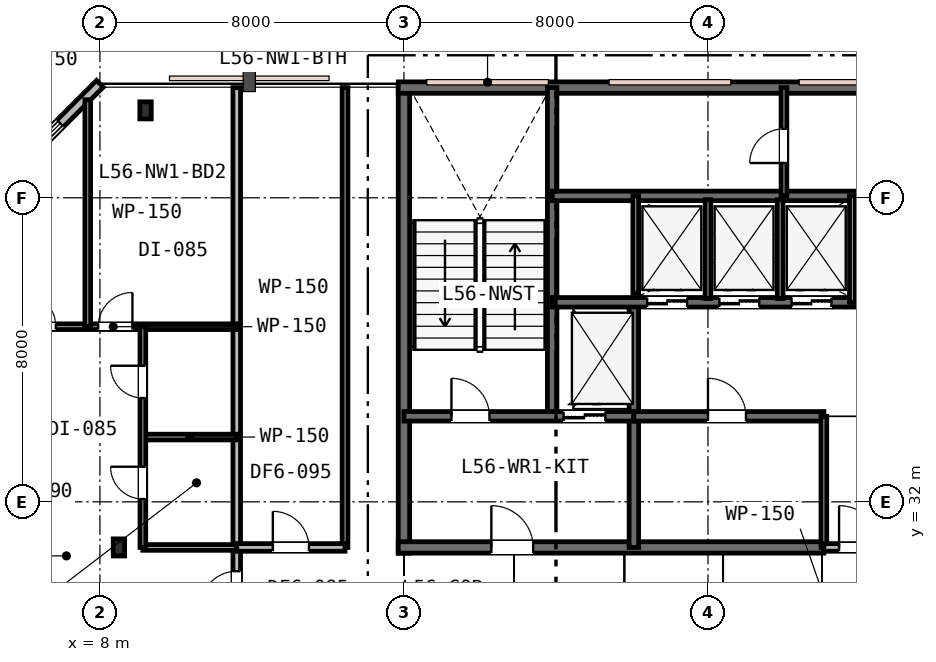
"""IFC4 building model, lengths in metres.
Left out: names, types, materials, properties, quantities, classifications, styles, units other than length and angle.
Written with IfcOpenShell. Run it as: python <this file> out.ifc"""

import sys

from ifc_helpers import new_model, si_unit, direction, frame, frame_2d, origin, origin_2d, place, context, subcontext, project, spatial, rectangle, i_section, extrude, element, fill, save


model = new_model("IFC4")
c1 = context("Model", 3, precision=1e-05, world=origin(), true_north=direction((0.0, 1.0)))
c2 = subcontext(c1, "Body", "Model", "MODEL_VIEW")
j1 = project(units=[si_unit("LENGTHUNIT", "METRE"), si_unit("PLANEANGLEUNIT", "RADIAN")], contexts=[c1])
p1 = place(None, origin())
s1 = spatial("IfcSite", under=j1, at=p1, CompositionType="ELEMENT")
p2 = place(p1, origin())
s2 = spatial("IfcBuilding", under=s1, at=p2, CompositionType="ELEMENT")
p3 = place(p2, frame((0.0, 0.0, 218.4)))
s3 = spatial("IfcBuildingStorey", under=s2, at=p3, CompositionType="ELEMENT", Elevation=218.4)
p4 = place(p3, frame((16.0, 30.65, 0.0), z_axis=(0.0, 0.0, 1.0), x_axis=(0.0, 1.0, 0.0)))
e1 = element("IfcWall", 1, at=p4, inside=s3, PredefinedType="SHEAR", context=c2, shape_type="SweptSolid", body=[
    extrude(rectangle(XDim=12.3, YDim=0.3, at=frame_2d((6.15, 0.0))), origin(), (0.0, 0.0, 1.0), 3.8),
])
p5 = place(p3, frame((15.85, 42.9, 0.0), z_axis=(0.0, 0.0, 1.0), x_axis=(1.0, 0.0, 0.0)))
e2 = element("IfcWall", 2, at=p5, inside=s3, PredefinedType="SHEAR", context=c2, shape_type="SweptSolid", body=[
    extrude(rectangle(XDim=24.3, YDim=0.3, at=frame_2d((12.15, 0.0))), origin(), (0.0, 0.0, 1.0), 3.8),
])
p6 = place(p3, frame((15.85, 30.8, 0.0), z_axis=(0.0, 0.0, 1.0), x_axis=(1.0, 0.0, 0.0)))
e3 = element("IfcWall", 3, at=p6, inside=s3, PredefinedType="SHEAR", context=c2, shape_type="SweptSolid", body=[
    extrude(rectangle(XDim=11.2, YDim=0.3, at=frame_2d((5.6, 0.0))), origin(), (0.0, 0.0, 1.0), 3.8),
])
p7 = place(p6, frame((2.45, 0.0, 0.0)))
e4 = element("IfcOpeningElement", 4, at=p7, cuts=e3, PredefinedType="OPENING", context=c2, shape_type="SweptSolid", body=[
    extrude(rectangle(XDim=1.1, YDim=2.15, at=frame_2d((0.55, 1.075))), frame((0.0, 0.16, 0.0), z_axis=(0.0, -1.0, 0.0), x_axis=(1.0, 0.0, 0.0)), (0.0, 0.0, 1.0), 0.32),
])
p8 = place(p3, frame((19.9, 34.25, 0.0), z_axis=(0.0, 0.0, 1.0), x_axis=(0.0, 1.0, 0.0)))
e5 = element("IfcWall", 5, at=p8, inside=s3, PredefinedType="SHEAR", context=c2, shape_type="SweptSolid", body=[
    extrude(rectangle(XDim=8.65, YDim=0.25, at=frame_2d((4.325, 0.0))), origin(), (0.0, 0.0, 1.0), 3.8),
])
p9 = place(p3, frame((22.05, 30.8, 0.0), z_axis=(0.0, 0.0, 1.0), x_axis=(0.0, 1.0, 0.0)))
e6 = element("IfcWall", 6, at=p9, inside=s3, PredefinedType="SHEAR", context=c2, shape_type="SweptSolid", body=[
    extrude(rectangle(XDim=6.45, YDim=0.25, at=frame_2d((3.225, 0.0))), origin(), (0.0, 0.0, 1.0), 3.8),
])
p10 = place(p3, frame((16.0, 34.25, 0.0), z_axis=(0.0, 0.0, 1.0), x_axis=(1.0, 0.0, 0.0)))
e7 = element("IfcWall", 7, at=p10, inside=s3, PredefinedType="SHEAR", context=c2, shape_type="SweptSolid", body=[
    extrude(rectangle(XDim=6.05, YDim=0.25, at=frame_2d((3.025, 0.0))), origin(), (0.0, 0.0, 1.0), 3.8),
])
p11 = place(p10, frame((1.25, 0.0, 0.0)))
e8 = element("IfcOpeningElement", 8, at=p11, cuts=e7, PredefinedType="OPENING", context=c2, shape_type="SweptSolid", body=[
    extrude(rectangle(XDim=1.0, YDim=2.15, at=frame_2d((0.5, 1.075))), frame((0.0, 0.135, 0.0), z_axis=(0.0, -1.0, 0.0), x_axis=(1.0, 0.0, 0.0)), (0.0, 0.0, 1.0), 0.27),
])
p12 = place(p10, frame((4.2, 0.0, 0.0)))
e9 = element("IfcOpeningElement", 9, at=p12, cuts=e7, PredefinedType="OPENING", context=c2, shape_type="SweptSolid", body=[
    extrude(rectangle(XDim=1.1, YDim=2.15, at=frame_2d((0.55, 1.075))), frame((0.0, 0.135, 0.0), z_axis=(0.0, -1.0, 0.0), x_axis=(1.0, 0.0, 0.0)), (0.0, 0.0, 1.0), 0.27),
])
p13 = place(p3, frame((22.05, 34.25, 0.0), z_axis=(0.0, 0.0, 1.0), x_axis=(1.0, 0.0, 0.0)))
e10 = element("IfcWall", 10, at=p13, inside=s3, PredefinedType="SHEAR", context=c2, shape_type="SweptSolid", body=[
    extrude(rectangle(XDim=5.0, YDim=0.25, at=frame_2d((2.5, 0.0))), origin(), (0.0, 0.0, 1.0), 3.8),
])
p14 = place(p13, frame((1.95, 0.0, 0.0)))
e11 = element("IfcOpeningElement", 11, at=p14, cuts=e10, PredefinedType="OPENING", context=c2, shape_type="SweptSolid", body=[
    extrude(rectangle(XDim=1.0, YDim=2.15, at=frame_2d((0.5, 1.075))), frame((0.0, 0.135, 0.0), z_axis=(0.0, -1.0, 0.0), x_axis=(1.0, 0.0, 0.0)), (0.0, 0.0, 1.0), 0.27),
])
p15 = place(p3, frame((19.9, 37.25, 0.0), z_axis=(0.0, 0.0, 1.0), x_axis=(1.0, 0.0, 0.0)))
e12 = element("IfcWall", 12, at=p15, inside=s3, PredefinedType="SHEAR", context=c2, shape_type="SweptSolid", body=[
    extrude(rectangle(XDim=16.2, YDim=0.25, at=frame_2d((8.1, 0.0))), origin(), (0.0, 0.0, 1.0), 3.8),
])
p16 = place(p15, frame((12.55, 0.0, 0.0)))
e13 = element("IfcOpeningElement", 13, at=p16, cuts=e12, PredefinedType="OPENING", context=c2, shape_type="SweptSolid", body=[
    extrude(rectangle(XDim=0.9, YDim=2.15, at=frame_2d((0.45, 1.075))), frame((0.0, 0.135, 0.0), z_axis=(0.0, -1.0, 0.0), x_axis=(1.0, 0.0, 0.0)), (0.0, 0.0, 1.0), 0.27),
])
p17 = place(p15, frame((2.5, 0.0, 0.0)))
e14 = element("IfcOpeningElement", 14, at=p17, cuts=e12, PredefinedType="OPENING", context=c2, shape_type="SweptSolid", body=[
    extrude(rectangle(XDim=1.05, YDim=2.15, at=frame_2d((0.525, 1.075))), frame((0.0, 0.135, 0.0), z_axis=(0.0, -1.0, 0.0), x_axis=(1.0, 0.0, 0.0)), (0.0, 0.0, 1.0), 0.27),
])
p18 = place(p15, frame((4.4, 0.0, 0.0)))
e15 = element("IfcOpeningElement", 15, at=p18, cuts=e12, PredefinedType="OPENING", context=c2, shape_type="SweptSolid", body=[
    extrude(rectangle(XDim=1.05, YDim=2.15, at=frame_2d((0.525, 1.075))), frame((0.0, 0.135, 0.0), z_axis=(0.0, -1.0, 0.0), x_axis=(1.0, 0.0, 0.0)), (0.0, 0.0, 1.0), 0.27),
])
p19 = place(p15, frame((6.3, 0.0, 0.0)))
e16 = element("IfcOpeningElement", 16, at=p19, cuts=e12, PredefinedType="OPENING", context=c2, shape_type="SweptSolid", body=[
    extrude(rectangle(XDim=1.05, YDim=2.15, at=frame_2d((0.525, 1.075))), frame((0.0, 0.135, 0.0), z_axis=(0.0, -1.0, 0.0), x_axis=(1.0, 0.0, 0.0)), (0.0, 0.0, 1.0), 0.27),
])
p20 = place(p3, frame((19.9, 40.05, 0.0), z_axis=(0.0, 0.0, 1.0), x_axis=(1.0, 0.0, 0.0)))
e17 = element("IfcWall", 17, at=p20, inside=s3, PredefinedType="SHEAR", context=c2, shape_type="SweptSolid", body=[
    extrude(rectangle(XDim=12.05, YDim=0.25, at=frame_2d((6.025, 0.0))), origin(), (0.0, 0.0, 1.0), 3.8),
])
for number, where, z_axis, x_axis in (
    (18, (8.5, 30.8, 0.0), (0.0, 0.0, 1.0), (1.0, 0.0, 0.0)),
    (19, (9.2, 42.3, 0.0), (0.0, 0.0, 1.0), (1.0, 0.0, 0.0)),
):
    element("IfcColumn", number, at=place(p3, frame(where, z_axis=z_axis, x_axis=x_axis)), inside=s3, PredefinedType="COLUMN", context=c2, shape_type="SweptSolid", body=[
        extrude(i_section(OverallWidth=0.3, OverallDepth=0.45, WebThickness=0.014, FlangeThickness=0.026, FilletRadius=0.027, at=origin_2d()), origin(), (0.0, 0.0, 1.0), 3.8),
    ])
p21 = place(p3, frame((8.0, 43.0, 0.0), z_axis=(0.0, 0.0, 1.0), x_axis=(-0.707106781187, -0.707106781187, 0.0)))
e20 = element("IfcWall", 20, at=p21, inside=s3, PredefinedType="STANDARD", context=c2, shape_type="SweptSolid", body=[
    extrude(rectangle(XDim=4.243, YDim=0.25, at=frame_2d((2.121, 0.0))), origin(), (0.0, 0.0, 1.0), 3.53),
])
p22 = place(p21, frame((1.473, 0.0, 0.75)))
e21 = element("IfcOpeningElement", 21, at=p22, cuts=e20, PredefinedType="OPENING", context=c2, shape_type="SweptSolid", body=[
    extrude(rectangle(XDim=1.8, YDim=1.85, at=frame_2d((0.9, 0.925))), frame((0.0, 0.135, 0.0), z_axis=(0.0, -1.0, 0.0), x_axis=(1.0, 0.0, 0.0)), (0.0, 0.0, 1.0), 0.27),
])
p23 = place(p3, frame((27.05, 30.8, 0.0), z_axis=(0.0, 0.0, 1.0), x_axis=(0.0, 1.0, 0.0)))
e22 = element("IfcWall", 22, at=p23, inside=s3, PredefinedType="PLUMBINGWALL", context=c2, shape_type="SweptSolid", body=[
    extrude(rectangle(XDim=3.45, YDim=0.15, at=frame_2d((1.725, 0.0))), origin(), (0.0, 0.0, 1.0), 3.22),
])
p24 = place(p3, frame((27.05, 30.8, 0.0), z_axis=(0.0, 0.0, 1.0), x_axis=(1.0, 0.0, 0.0)))
e23 = element("IfcWall", 23, at=p24, inside=s3, PredefinedType="PARTITIONING", context=c2, shape_type="SweptSolid", body=[
    extrude(rectangle(XDim=1.9, YDim=0.2, at=frame_2d((0.95, 0.0))), origin(), (0.0, 0.0, 1.0), 3.22),
])
p25 = place(p24, frame((0.4, 0.0, 0.0)))
e24 = element("IfcOpeningElement", 24, at=p25, cuts=e23, PredefinedType="OPENING", context=c2, shape_type="SweptSolid", body=[
    extrude(rectangle(XDim=1.1, YDim=2.15, at=frame_2d((0.55, 1.075))), frame((0.0, 0.11, 0.0), z_axis=(0.0, -1.0, 0.0), x_axis=(1.0, 0.0, 0.0)), (0.0, 0.0, 1.0), 0.22),
])
p26 = place(p3, frame((22.1, 37.49, 0.0), z_axis=(0.0, 0.0, 1.0), x_axis=(0.0, 1.0, 0.0)))
e25 = element("IfcWall", 25, at=p26, inside=s3, PredefinedType="PLUMBINGWALL", context=c2, shape_type="SweptSolid", body=[
    extrude(rectangle(XDim=2.56, YDim=0.15, at=frame_2d((1.28, 0.0))), origin(), (0.0, 0.0, 1.0), 3.53),
])
p27 = place(p3, frame((27.8, 37.25, 0.0), z_axis=(0.0, 0.0, 1.0), x_axis=(0.0, 1.0, 0.0)))
e26 = element("IfcWall", 26, at=p27, inside=s3, PredefinedType="PLUMBINGWALL", context=c2, shape_type="SweptSolid", body=[
    extrude(rectangle(XDim=2.8, YDim=0.15, at=frame_2d((1.4, 0.0))), origin(), (0.0, 0.0, 1.0), 3.53),
])
for number, where, z_axis, x_axis in (
    (27, (24.0, 37.35, 0.0), (0.0, 0.0, 1.0), (0.0, 1.0, 0.0)),
    (28, (25.9, 37.35, 0.0), (0.0, 0.0, 1.0), (0.0, 1.0, 0.0)),
):
    element("IfcWall", number, at=place(p3, frame(where, z_axis=z_axis, x_axis=x_axis)), inside=s3, PredefinedType="PLUMBINGWALL", context=c2, shape_type="SweptSolid", body=[
        extrude(rectangle(XDim=2.6, YDim=0.15, at=frame_2d((1.3, 0.0))), origin(), (0.0, 0.0, 1.0), 3.53),
    ])
p28 = place(p3, frame((26.0, 40.05, 0.0), z_axis=(0.0, 0.0, 1.0), x_axis=(0.0, 1.0, 0.0)))
e29 = element("IfcWall", 29, at=p28, inside=s3, PredefinedType="PARTITIONING", context=c2, shape_type="SweptSolid", body=[
    extrude(rectangle(XDim=2.85, YDim=0.15, at=frame_2d((1.425, 0.0))), origin(), (0.0, 0.0, 1.0), 3.53),
])
p29 = place(p28, frame((0.865, 0.0, 0.0)))
e30 = element("IfcOpeningElement", 30, at=p29, cuts=e29, PredefinedType="OPENING", context=c2, shape_type="SweptSolid", body=[
    extrude(rectangle(XDim=0.9, YDim=2.15, at=frame_2d((0.45, 1.075))), frame((0.0, 0.085, 0.0), z_axis=(0.0, -1.0, 0.0), x_axis=(1.0, 0.0, 0.0)), (0.0, 0.0, 1.0), 0.17),
])
p30 = place(p3, frame((11.6, 17.0, 0.0), z_axis=(0.0, 0.0, 1.0), x_axis=(0.0, 1.0, 0.0)))
e31 = element("IfcWall", 31, at=p30, inside=s3, PredefinedType="PARTITIONING", context=c2, shape_type="SweptSolid", body=[
    extrude(rectangle(XDim=25.9, YDim=0.2, at=frame_2d((12.95, 0.0))), origin(), (0.0, 0.0, 1.0), 2.92),
])
p31 = place(p30, frame((12.225, 0.0, 0.0)))
e32 = element("IfcOpeningElement", 32, at=p31, cuts=e31, PredefinedType="OPENING", context=c2, shape_type="SweptSolid", body=[
    extrude(rectangle(XDim=0.95, YDim=2.15, at=frame_2d((0.475, 1.075))), frame((0.0, 0.11, 0.0), z_axis=(0.0, -1.0, 0.0), x_axis=(1.0, 0.0, 0.0)), (0.0, 0.0, 1.0), 0.22),
])
p32 = place(p30, frame((0.723, 0.0, 0.0)))
e33 = element("IfcOpeningElement", 33, at=p32, cuts=e31, PredefinedType="OPENING", context=c2, shape_type="SweptSolid", body=[
    extrude(rectangle(XDim=0.95, YDim=2.15, at=frame_2d((0.475, 1.075))), frame((0.0, 0.11, 0.0), z_axis=(0.0, -1.0, 0.0), x_axis=(1.0, 0.0, 0.0)), (0.0, 0.0, 1.0), 0.22),
])
p33 = place(p3, frame((9.13, 30.8, 0.0), z_axis=(0.0, 0.0, 1.0), x_axis=(1.0, 0.0, 0.0)))
e34 = element("IfcWall", 34, at=p33, inside=s3, PredefinedType="PARTITIONING", context=c2, shape_type="SweptSolid", body=[
    extrude(rectangle(XDim=2.47, YDim=0.15, at=frame_2d((1.235, 0.0))), origin(), (0.0, 0.0, 1.0), 2.92),
])
p34 = place(p3, frame((9.13, 33.704, 0.0), z_axis=(0.0, 0.0, 1.0), x_axis=(1.0, 0.0, 0.0)))
e35 = element("IfcWall", 35, at=p34, inside=s3, PredefinedType="PARTITIONING", context=c2, shape_type="SweptSolid", body=[
    extrude(rectangle(XDim=2.47, YDim=0.15, at=frame_2d((1.235, 0.0))), origin(), (0.0, 0.0, 1.0), 3.53),
])
p35 = place(p3, frame((5.1, 36.608, 0.0), z_axis=(0.0, 0.0, 1.0), x_axis=(1.0, 0.0, 0.0)))
e36 = element("IfcWall", 36, at=p35, inside=s3, PredefinedType="PARTITIONING", context=c2, shape_type="SweptSolid", body=[
    extrude(rectangle(XDim=6.5, YDim=0.15, at=frame_2d((3.25, 0.0))), origin(), (0.0, 0.0, 1.0), 3.24),
])
p36 = place(p35, frame((0.84, 0.0, 0.0)))
e37 = element("IfcOpeningElement", 37, at=p36, cuts=e36, PredefinedType="OPENING", context=c2, shape_type="SweptSolid", body=[
    extrude(rectangle(XDim=0.9, YDim=2.15, at=frame_2d((0.45, 1.075))), frame((0.0, 0.085, 0.0), z_axis=(0.0, -1.0, 0.0), x_axis=(1.0, 0.0, 0.0)), (0.0, 0.0, 1.0), 0.17),
])
p37 = place(p35, frame((2.855, 0.0, 0.0)))
e38 = element("IfcOpeningElement", 38, at=p37, cuts=e36, PredefinedType="OPENING", context=c2, shape_type="SweptSolid", body=[
    extrude(rectangle(XDim=0.9, YDim=2.15, at=frame_2d((0.45, 1.075))), frame((0.0, 0.085, 0.0), z_axis=(0.0, -1.0, 0.0), x_axis=(1.0, 0.0, 0.0)), (0.0, 0.0, 1.0), 0.17),
])
p38 = place(p3, frame((9.13, 30.8, 0.0), z_axis=(0.0, 0.0, 1.0), x_axis=(0.0, 1.0, 0.0)))
e39 = element("IfcWall", 39, at=p38, inside=s3, PredefinedType="PARTITIONING", context=c2, shape_type="SweptSolid", body=[
    extrude(rectangle(XDim=5.808, YDim=0.15, at=frame_2d((2.904, 0.0))), origin(), (0.0, 0.0, 1.0), 2.92),
])
p39 = place(p38, frame((1.274, 0.0, 0.0)))
e40 = element("IfcOpeningElement", 40, at=p39, cuts=e39, PredefinedType="OPENING", context=c2, shape_type="SweptSolid", body=[
    extrude(rectangle(XDim=0.85, YDim=2.15, at=frame_2d((0.425, 1.075))), frame((0.0, 0.085, 0.0), z_axis=(0.0, -1.0, 0.0), x_axis=(1.0, 0.0, 0.0)), (0.0, 0.0, 1.0), 0.17),
])
p40 = place(p38, frame((3.931, 0.0, 0.0)))
e41 = element("IfcOpeningElement", 41, at=p40, cuts=e39, PredefinedType="OPENING", context=c2, shape_type="SweptSolid", body=[
    extrude(rectangle(XDim=0.85, YDim=2.15, at=frame_2d((0.425, 1.075))), frame((0.0, 0.085, 0.0), z_axis=(0.0, -1.0, 0.0), x_axis=(1.0, 0.0, 0.0)), (0.0, 0.0, 1.0), 0.17),
])
p41 = place(p3, frame((7.68, 36.608, 0.0), z_axis=(0.0, 0.0, 1.0), x_axis=(0.0, 1.0, 0.0)))
e42 = element("IfcWall", 42, at=p41, inside=s3, PredefinedType="PARTITIONING", context=c2, shape_type="SweptSolid", body=[
    extrude(rectangle(XDim=5.972, YDim=0.15, at=frame_2d((2.986, 0.0))), origin(), (0.0, 0.0, 1.0), 3.24),
])
p42 = place(p3, frame((14.45, 30.8, 0.0), z_axis=(0.0, 0.0, 1.0), x_axis=(0.0, 1.0, 0.0)))
e43 = element("IfcWall", 43, at=p42, inside=s3, PredefinedType="PARTITIONING", context=c2, shape_type="SweptSolid", body=[
    extrude(rectangle(XDim=12.1, YDim=0.15, at=frame_2d((6.05, 0.0))), origin(), (0.0, 0.0, 1.0), 2.92),
])
p43 = place(p3, frame((11.6, 30.8, 0.0), z_axis=(0.0, 0.0, 1.0), x_axis=(1.0, 0.0, 0.0)))
e44 = element("IfcWall", 44, at=p43, inside=s3, PredefinedType="PARTITIONING", context=c2, shape_type="SweptSolid", body=[
    extrude(rectangle(XDim=2.85, YDim=0.2, at=frame_2d((1.425, 0.0))), origin(), (0.0, 0.0, 1.0), 2.92),
])
p44 = place(p43, frame((0.95, 0.0, 0.0)))
e45 = element("IfcOpeningElement", 45, at=p44, cuts=e44, PredefinedType="OPENING", context=c2, shape_type="SweptSolid", body=[
    extrude(rectangle(XDim=0.95, YDim=2.15, at=frame_2d((0.475, 1.075))), frame((0.0, 0.11, 0.0), z_axis=(0.0, -1.0, 0.0), x_axis=(1.0, 0.0, 0.0)), (0.0, 0.0, 1.0), 0.22),
])
p45 = place(p22, origin())
e46 = element("IfcWindow", 46, at=p45, inside=s3, PartitioningType="SINGLE_PANEL", PredefinedType="WINDOW", context=c2, shape_type="SweptSolid", body=[
    extrude(rectangle(XDim=1.8, YDim=1.85, at=frame_2d((0.9, 0.925))), frame((0.0, 0.03, 0.0), z_axis=(0.0, -1.0, 0.0), x_axis=(1.0, 0.0, 0.0)), (0.0, 0.0, 1.0), 0.06),
])
fill(e21, e46)
p46 = place(p25, origin())
e47 = element("IfcDoor", 47, at=p46, inside=s3, OperationType="SINGLE_SWING_LEFT", PredefinedType="DOOR", context=c2, shape_type="SweptSolid", body=[
    extrude(rectangle(XDim=1.1, YDim=2.15, at=frame_2d((0.55, 1.075))), frame((0.0, 0.025, 0.0), z_axis=(0.0, -1.0, 0.0), x_axis=(1.0, 0.0, 0.0)), (0.0, 0.0, 1.0), 0.05),
])
fill(e24, e47)
p47 = place(p11, origin())
e48 = element("IfcDoor", 48, at=p47, inside=s3, OperationType="SINGLE_SWING_LEFT", PredefinedType="DOOR", context=c2, shape_type="SweptSolid", body=[
    extrude(rectangle(XDim=1.0, YDim=2.15, at=frame_2d((0.5, 1.075))), frame((0.0, 0.025, 0.0), z_axis=(0.0, -1.0, 0.0), x_axis=(1.0, 0.0, 0.0)), (0.0, 0.0, 1.0), 0.05),
])
fill(e8, e48)
p48 = place(p7, origin())
e49 = element("IfcDoor", 49, at=p48, inside=s3, OperationType="SINGLE_SWING_LEFT", PredefinedType="DOOR", context=c2, shape_type="SweptSolid", body=[
    extrude(rectangle(XDim=1.1, YDim=2.15, at=frame_2d((0.55, 1.075))), frame((0.0, 0.025, 0.0), z_axis=(0.0, -1.0, 0.0), x_axis=(1.0, 0.0, 0.0)), (0.0, 0.0, 1.0), 0.05),
])
fill(e4, e49)
p49 = place(p14, origin())
e50 = element("IfcDoor", 50, at=p49, inside=s3, OperationType="SINGLE_SWING_LEFT", PredefinedType="DOOR", context=c2, shape_type="SweptSolid", body=[
    extrude(rectangle(XDim=1.0, YDim=2.15, at=frame_2d((0.5, 1.075))), frame((0.0, 0.025, 0.0), z_axis=(0.0, -1.0, 0.0), x_axis=(1.0, 0.0, 0.0)), (0.0, 0.0, 1.0), 0.05),
])
fill(e11, e50)
p50 = place(p29, origin())
e51 = element("IfcDoor", 51, at=p50, inside=s3, OperationType="SINGLE_SWING_LEFT", PredefinedType="DOOR", context=c2, shape_type="SweptSolid", body=[
    extrude(rectangle(XDim=0.9, YDim=2.15, at=frame_2d((0.45, 1.075))), frame((0.0, 0.025, 0.0), z_axis=(0.0, -1.0, 0.0), x_axis=(1.0, 0.0, 0.0)), (0.0, 0.0, 1.0), 0.05),
])
fill(e30, e51)
p51 = place(p31, origin())
e52 = element("IfcDoor", 52, at=p51, inside=s3, OperationType="SINGLE_SWING_LEFT", PredefinedType="DOOR", context=c2, shape_type="SweptSolid", body=[
    extrude(rectangle(XDim=0.95, YDim=2.15, at=frame_2d((0.475, 1.075))), frame((0.0, 0.025, 0.0), z_axis=(0.0, -1.0, 0.0), x_axis=(1.0, 0.0, 0.0)), (0.0, 0.0, 1.0), 0.05),
])
fill(e32, e52)
p52 = place(p39, origin())
e53 = element("IfcDoor", 53, at=p52, inside=s3, OperationType="SINGLE_SWING_RIGHT", PredefinedType="DOOR", context=c2, shape_type="SweptSolid", body=[
    extrude(rectangle(XDim=0.85, YDim=2.15, at=frame_2d((0.425, 1.075))), frame((0.0, 0.025, 0.0), z_axis=(0.0, -1.0, 0.0), x_axis=(1.0, 0.0, 0.0)), (0.0, 0.0, 1.0), 0.05),
])
fill(e40, e53)
p53 = place(p40, origin())
e54 = element("IfcDoor", 54, at=p53, inside=s3, OperationType="SINGLE_SWING_RIGHT", PredefinedType="DOOR", context=c2, shape_type="SweptSolid", body=[
    extrude(rectangle(XDim=0.85, YDim=2.15, at=frame_2d((0.425, 1.075))), frame((0.0, 0.025, 0.0), z_axis=(0.0, -1.0, 0.0), x_axis=(1.0, 0.0, 0.0)), (0.0, 0.0, 1.0), 0.05),
])
fill(e41, e54)
p54 = place(p36, origin())
e55 = element("IfcDoor", 55, at=p54, inside=s3, OperationType="SINGLE_SWING_LEFT", PredefinedType="DOOR", context=c2, shape_type="SweptSolid", body=[
    extrude(rectangle(XDim=0.9, YDim=2.15, at=frame_2d((0.45, 1.075))), frame((0.0, 0.025, 0.0), z_axis=(0.0, -1.0, 0.0), x_axis=(1.0, 0.0, 0.0)), (0.0, 0.0, 1.0), 0.05),
])
fill(e37, e55)
p55 = place(p37, origin())
e56 = element("IfcDoor", 56, at=p55, inside=s3, OperationType="SINGLE_SWING_RIGHT", PredefinedType="DOOR", context=c2, shape_type="SweptSolid", body=[
    extrude(rectangle(XDim=0.9, YDim=2.15, at=frame_2d((0.45, 1.075))), frame((0.0, 0.025, 0.0), z_axis=(0.0, -1.0, 0.0), x_axis=(1.0, 0.0, 0.0)), (0.0, 0.0, 1.0), 0.05),
])
fill(e38, e56)
p56 = place(p44, origin())
e57 = element("IfcDoor", 57, at=p56, inside=s3, OperationType="SINGLE_SWING_LEFT", PredefinedType="DOOR", context=c2, shape_type="SweptSolid", body=[
    extrude(rectangle(XDim=0.95, YDim=2.15, at=frame_2d((0.475, 1.075))), frame((0.0, 0.025, 0.0), z_axis=(0.0, -1.0, 0.0), x_axis=(1.0, 0.0, 0.0)), (0.0, 0.0, 1.0), 0.05),
])
fill(e45, e57)
p57 = place(p12, origin())
e58 = element("IfcDoor", 58, at=p57, inside=s3, OperationType="DOUBLE_DOOR_SLIDING", PredefinedType="DOOR", context=c2, shape_type="SweptSolid", body=[
    extrude(rectangle(XDim=1.1, YDim=2.15, at=frame_2d((0.55, 1.075))), frame((0.0, 0.025, 0.0), z_axis=(0.0, -1.0, 0.0), x_axis=(1.0, 0.0, 0.0)), (0.0, 0.0, 1.0), 0.05),
])
fill(e9, e58)
p58 = place(p17, origin())
e59 = element("IfcDoor", 59, at=p58, inside=s3, OperationType="DOUBLE_DOOR_SLIDING", PredefinedType="DOOR", context=c2, shape_type="SweptSolid", body=[
    extrude(rectangle(XDim=1.05, YDim=2.15, at=frame_2d((0.525, 1.075))), frame((0.0, 0.025, 0.0), z_axis=(0.0, -1.0, 0.0), x_axis=(1.0, 0.0, 0.0)), (0.0, 0.0, 1.0), 0.05),
])
fill(e14, e59)
p59 = place(p18, origin())
e60 = element("IfcDoor", 60, at=p59, inside=s3, OperationType="DOUBLE_DOOR_SLIDING", PredefinedType="DOOR", context=c2, shape_type="SweptSolid", body=[
    extrude(rectangle(XDim=1.05, YDim=2.15, at=frame_2d((0.525, 1.075))), frame((0.0, 0.025, 0.0), z_axis=(0.0, -1.0, 0.0), x_axis=(1.0, 0.0, 0.0)), (0.0, 0.0, 1.0), 0.05),
])
fill(e15, e60)
p60 = place(p19, origin())
e61 = element("IfcDoor", 61, at=p60, inside=s3, OperationType="DOUBLE_DOOR_SLIDING", PredefinedType="DOOR", context=c2, shape_type="SweptSolid", body=[
    extrude(rectangle(XDim=1.05, YDim=2.15, at=frame_2d((0.525, 1.075))), frame((0.0, 0.025, 0.0), z_axis=(0.0, -1.0, 0.0), x_axis=(1.0, 0.0, 0.0)), (0.0, 0.0, 1.0), 0.05),
])
fill(e16, e61)
save(model, sys.argv[1])
